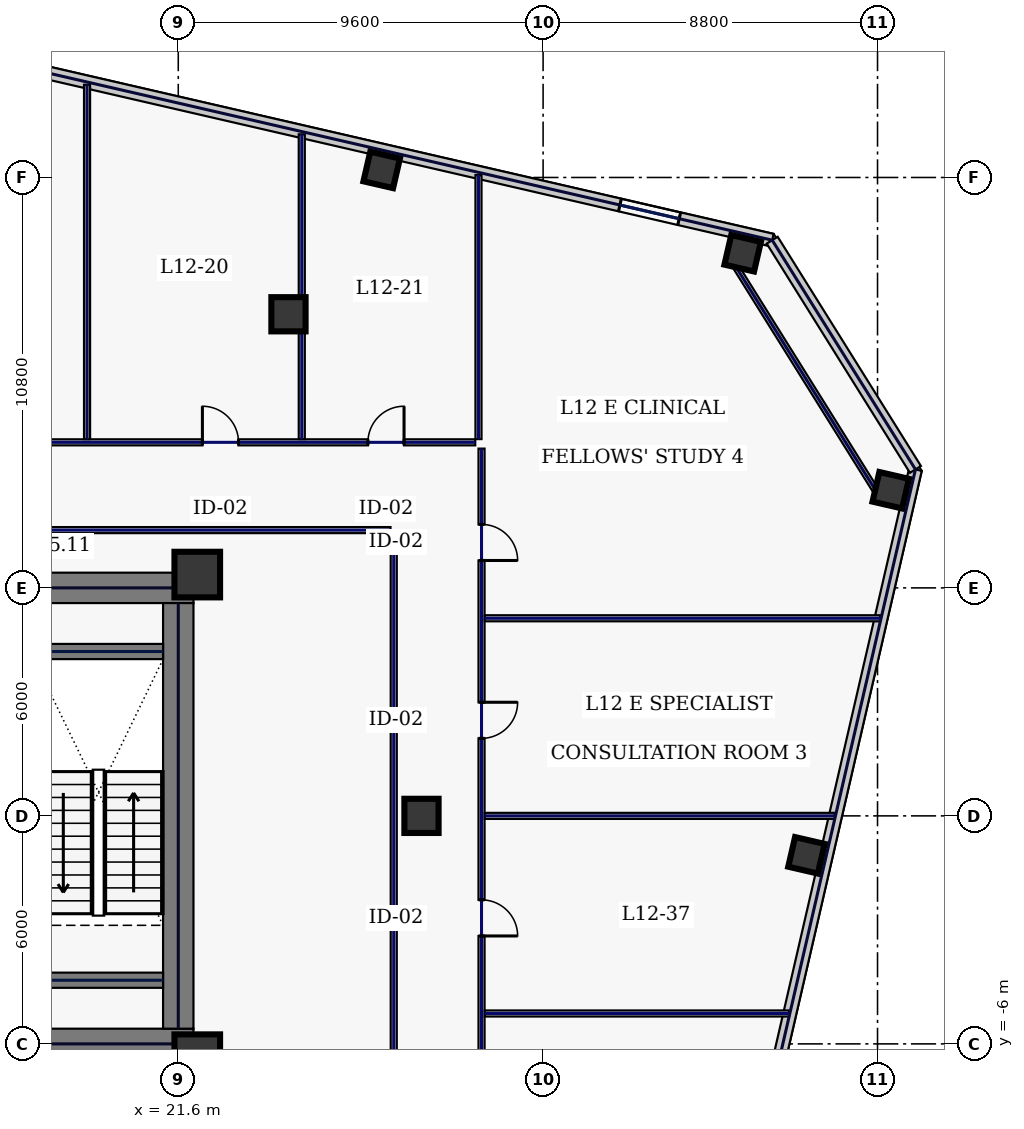
"""IFC4 building model, lengths in metres.
Left out: names, types, materials, properties, quantities, classifications, styles, units other than length and angle.
Written with IfcOpenShell. Run it as: python <this file> out.ifc"""

import sys

from ifc_helpers import new_model, si_unit, direction, frame, frame_2d, origin, origin_2d, place, context, subcontext, project, spatial, rectangle, hollow_rectangle, extrude, element, fill, save


model = new_model("IFC4")
c1 = context("Model", 3, precision=1e-05, world=origin(), true_north=direction((0.0, 1.0)))
c2 = subcontext(c1, "Body", "Model", "MODEL_VIEW")
j1 = project(units=[si_unit("LENGTHUNIT", "METRE"), si_unit("PLANEANGLEUNIT", "RADIAN")], contexts=[c1])
p1 = place(None, origin())
s1 = spatial("IfcSite", under=j1, at=p1, CompositionType="ELEMENT")
p2 = place(p1, origin())
s2 = spatial("IfcBuilding", under=s1, at=p2, CompositionType="ELEMENT")
p3 = place(p2, frame((0.0, 0.0, 59.4)))
s3 = spatial("IfcBuildingStorey", under=s2, at=p3, CompositionType="ELEMENT", Elevation=59.4)
for number, where, z_axis, x_axis in (
    (1, (10.4, 6.0, 0.0), (0.0, 0.0, 1.0), (1.0, 0.0, 0.0)),
    (2, (10.4, -6.0, 0.0), (0.0, 0.0, 1.0), (1.0, 0.0, 0.0)),
):
    element("IfcWall", number, at=place(p3, frame(where, z_axis=z_axis, x_axis=x_axis)), inside=s3, PredefinedType="SHEAR", context=c2, shape_type="SweptSolid", body=[
        extrude(rectangle(XDim=11.6, YDim=0.8, at=frame_2d((5.8, 0.0))), origin(), (0.0, 0.0, 1.0), 3.74),
    ])
p4 = place(p3, frame((21.6, -5.6, 0.0), z_axis=(0.0, 0.0, 1.0), x_axis=(0.0, 1.0, 0.0)))
e3 = element("IfcWall", 3, at=p4, inside=s3, PredefinedType="SHEAR", context=c2, shape_type="SweptSolid", body=[
    extrude(rectangle(XDim=11.2, YDim=0.8, at=frame_2d((5.6, 0.0))), origin(), (0.0, 0.0, 1.0), 3.74),
])
for number, where, z_axis, x_axis in (
    (4, (17.8, -4.325, 0.0), (0.0, 0.0, 1.0), (1.0, 0.0, 0.0)),
    (5, (17.8, 4.325, 0.0), (0.0, 0.0, 1.0), (1.0, 0.0, 0.0)),
):
    element("IfcWall", number, at=place(p3, frame(where, z_axis=z_axis, x_axis=x_axis)), inside=s3, PredefinedType="SHEAR", context=c2, shape_type="SweptSolid", body=[
        extrude(rectangle(XDim=3.4, YDim=0.4, at=frame_2d((1.7, 0.0))), origin(), (0.0, 0.0, 1.0), 3.74),
    ])
for number, where, z_axis, x_axis in (
    (6, (22.1, -6.35, 0.0), (0.0, 0.0, 1.0), (1.0, 0.0, 0.0)),
    (7, (22.1, 6.35, 0.0), (0.0, 0.0, 1.0), (1.0, 0.0, 0.0)),
):
    element("IfcColumn", number, at=place(p3, frame(where, z_axis=z_axis, x_axis=x_axis)), inside=s3, PredefinedType="COLUMN", context=c2, shape_type="SweptSolid", body=[
        extrude(hollow_rectangle(XDim=1.2, YDim=1.2, WallThickness=0.05, at=origin_2d()), origin(), (0.0, 0.0, 1.0), 3.74),
    ])
for number, where, z_axis, x_axis in (
    (8, (24.5, 13.2, 0.0), (0.0, 0.0, 1.0), (1.0, 0.0, 0.0)),
    (9, (28.0, 0.0, 0.0), (0.0, 0.0, 1.0), (1.0, 0.0, 0.0)),
):
    element("IfcColumn", number, at=place(p3, frame(where, z_axis=z_axis, x_axis=x_axis)), inside=s3, PredefinedType="COLUMN", context=c2, shape_type="SweptSolid", body=[
        extrude(hollow_rectangle(XDim=0.9, YDim=0.9, WallThickness=0.04, at=origin_2d()), origin(), (0.0, 0.0, 1.0), 3.74),
    ])
for number, where, z_axis, x_axis in (
    (10, (36.451, 14.806, 0.0), (0.0, 0.0, 1.0), (0.974, -0.225, 0.0)),
    (11, (26.952, 16.999, 0.0), (0.0, 0.0, 1.0), (0.974, -0.225, 0.0)),
    (12, (38.13, -1.038, 0.0), (0.0, 0.0, 1.0), (0.974, -0.225, 0.0)),
    (13, (40.348, 8.57, 0.0), (0.0, 0.0, 1.0), (0.974, -0.225, 0.0)),
):
    element("IfcColumn", number, at=place(p3, frame(where, z_axis=z_axis, x_axis=x_axis)), inside=s3, PredefinedType="COLUMN", context=c2, shape_type="SweptSolid", body=[
        extrude(hollow_rectangle(XDim=0.8, YDim=0.8, WallThickness=0.036, at=origin_2d()), origin(), (0.0, 0.0, 1.0), 3.74),
    ])
p5 = place(p3, frame((37.229, 15.15, 0.0), z_axis=(0.0, 0.0, 1.0), x_axis=(-0.97436993772, 0.224951604723, 0.0)))
e14 = element("IfcWall", 14, at=p5, inside=s3, PredefinedType="STANDARD", context=c2, shape_type="SweptSolid", body=[
    extrude(rectangle(XDim=22.651, YDim=0.34, at=frame_2d((11.326, 0.0))), origin(), (0.0, 0.0, 1.0), 3.74),
])
p6 = place(p5, frame((2.512, 0.0, 0.22)))
e15 = element("IfcOpeningElement", 15, at=p6, cuts=e14, PredefinedType="OPENING", context=c2, shape_type="SweptSolid", body=[
    extrude(rectangle(XDim=1.6, YDim=1.2, at=frame_2d((0.8, 0.6))), frame((0.0, 0.18, 0.0), z_axis=(0.0, -1.0, 0.0), x_axis=(1.0, 0.0, 0.0)), (0.0, 0.0, 1.0), 0.36),
])
p7 = place(p3, frame((31.82, -30.637, 0.0), z_axis=(0.0, 0.0, 1.0), x_axis=(0.224949969076, 0.974370315338, 0.0)))
e16 = element("IfcWall", 16, at=p7, inside=s3, PredefinedType="STANDARD", context=c2, shape_type="SweptSolid", body=[
    extrude(rectangle(XDim=40.8, YDim=0.34, at=frame_2d((20.4, 0.0))), origin(), (0.0, 0.0, 1.0), 3.74),
])
p8 = place(p7, frame((4.3, 0.0, 0.22)))
e17 = element("IfcOpeningElement", 17, at=p8, cuts=e16, PredefinedType="OPENING", context=c2, shape_type="SweptSolid", body=[
    extrude(rectangle(XDim=1.6, YDim=1.2, at=frame_2d((0.8, 0.6))), frame((0.0, 0.18, 0.0), z_axis=(0.0, -1.0, 0.0), x_axis=(1.0, 0.0, 0.0)), (0.0, 0.0, 1.0), 0.36),
])
p9 = place(p7, frame((14.5, 0.0, 0.22)))
e18 = element("IfcOpeningElement", 18, at=p9, cuts=e16, PredefinedType="OPENING", context=c2, shape_type="SweptSolid", body=[
    extrude(rectangle(XDim=1.6, YDim=1.2, at=frame_2d((0.8, 0.6))), frame((0.0, 0.18, 0.0), z_axis=(0.0, -1.0, 0.0), x_axis=(1.0, 0.0, 0.0)), (0.0, 0.0, 1.0), 0.36),
])
p10 = place(p3, frame((40.998, 9.117, 0.0), z_axis=(0.0, 0.0, 1.0), x_axis=(-0.529921811158, 0.848046504656, 0.0)))
e19 = element("IfcWall", 19, at=p10, inside=s3, PredefinedType="STANDARD", context=c2, shape_type="SweptSolid", body=[
    extrude(rectangle(XDim=7.113, YDim=0.34, at=frame_2d((3.557, 0.0))), origin(), (0.0, 0.0, 1.0), 3.74),
])
p11 = place(p3, frame((40.06, 8.389, 0.0), z_axis=(0.0, 0.0, 1.0), x_axis=(-0.529927317139, 0.848043064089, 0.0)))
e20 = element("IfcWall", 20, at=p11, inside=s3, PredefinedType="PARTITIONING", context=c2, shape_type="SweptSolid", body=[
    extrude(rectangle(XDim=7.354, YDim=0.16, at=frame_2d((3.677, 0.0))), origin(), (0.0, 0.0, 1.0), 1.535),
])
p12 = place(p3, frame((-29.415, 9.83, 0.0), z_axis=(0.0, 0.0, 1.0), x_axis=(1.0, 0.0, 0.0)))
e21 = element("IfcWall", 21, at=p12, inside=s3, PredefinedType="PARTITIONING", context=c2, shape_type="SweptSolid", body=[
    extrude(rectangle(XDim=58.83, YDim=0.16, at=frame_2d((29.415, 0.0))), origin(), (0.0, 0.0, 1.0), 3.74),
])
p13 = place(p12, frame((2.044, 0.0, 0.0)))
e22 = element("IfcOpeningElement", 22, at=p13, cuts=e21, PredefinedType="OPENING", context=c2, shape_type="SweptSolid", body=[
    extrude(rectangle(XDim=1.05, YDim=2.2, at=frame_2d((0.525, 1.1))), frame((0.0, 0.09, 0.0), z_axis=(0.0, -1.0, 0.0), x_axis=(1.0, 0.0, 0.0)), (0.0, 0.0, 1.0), 0.18),
])
p14 = place(p12, frame((7.663, 0.0, 0.0)))
e23 = element("IfcOpeningElement", 23, at=p14, cuts=e21, PredefinedType="OPENING", context=c2, shape_type="SweptSolid", body=[
    extrude(rectangle(XDim=0.95, YDim=2.2, at=frame_2d((0.475, 1.1))), frame((0.0, 0.09, 0.0), z_axis=(0.0, -1.0, 0.0), x_axis=(1.0, 0.0, 0.0)), (0.0, 0.0, 1.0), 0.18),
])
p15 = place(p12, frame((14.188, 0.0, 0.0)))
e24 = element("IfcOpeningElement", 24, at=p15, cuts=e21, PredefinedType="OPENING", context=c2, shape_type="SweptSolid", body=[
    extrude(rectangle(XDim=0.95, YDim=2.2, at=frame_2d((0.475, 1.1))), frame((0.0, 0.09, 0.0), z_axis=(0.0, -1.0, 0.0), x_axis=(1.0, 0.0, 0.0)), (0.0, 0.0, 1.0), 0.18),
])
p16 = place(p12, frame((22.025, 0.0, 0.0)))
e25 = element("IfcOpeningElement", 25, at=p16, cuts=e21, PredefinedType="OPENING", context=c2, shape_type="SweptSolid", body=[
    extrude(rectangle(XDim=1.15, YDim=2.2, at=frame_2d((0.575, 1.1))), frame((0.0, 0.09, 0.0), z_axis=(0.0, -1.0, 0.0), x_axis=(1.0, 0.0, 0.0)), (0.0, 0.0, 1.0), 0.18),
])
p17 = place(p12, frame((32.225, 0.0, 0.0)))
e26 = element("IfcOpeningElement", 26, at=p17, cuts=e21, PredefinedType="OPENING", context=c2, shape_type="SweptSolid", body=[
    extrude(rectangle(XDim=0.95, YDim=2.2, at=frame_2d((0.475, 1.1))), frame((0.0, 0.09, 0.0), z_axis=(0.0, -1.0, 0.0), x_axis=(1.0, 0.0, 0.0)), (0.0, 0.0, 1.0), 0.18),
])
p18 = place(p12, frame((42.925, 0.0, 0.0)))
e27 = element("IfcOpeningElement", 27, at=p18, cuts=e21, PredefinedType="OPENING", context=c2, shape_type="SweptSolid", body=[
    extrude(rectangle(XDim=1.05, YDim=2.2, at=frame_2d((0.525, 1.1))), frame((0.0, 0.09, 0.0), z_axis=(0.0, -1.0, 0.0), x_axis=(1.0, 0.0, 0.0)), (0.0, 0.0, 1.0), 0.18),
])
p19 = place(p12, frame((51.65, 0.0, 0.0)))
e28 = element("IfcOpeningElement", 28, at=p19, cuts=e21, PredefinedType="OPENING", context=c2, shape_type="SweptSolid", body=[
    extrude(rectangle(XDim=0.95, YDim=2.2, at=frame_2d((0.475, 1.1))), frame((0.0, 0.09, 0.0), z_axis=(0.0, -1.0, 0.0), x_axis=(1.0, 0.0, 0.0)), (0.0, 0.0, 1.0), 0.18),
])
p20 = place(p12, frame((56.006, 0.0, 0.0)))
e29 = element("IfcOpeningElement", 29, at=p20, cuts=e21, PredefinedType="OPENING", context=c2, shape_type="SweptSolid", body=[
    extrude(rectangle(XDim=0.95, YDim=2.2, at=frame_2d((0.475, 1.1))), frame((0.0, 0.09, 0.0), z_axis=(0.0, -1.0, 0.0), x_axis=(1.0, 0.0, 0.0)), (0.0, 0.0, 1.0), 0.18),
])
p21 = place(p3, frame((29.58, 9.665, 0.0), z_axis=(0.0, 0.0, 1.0), x_axis=(0.0, -1.0, 0.0)))
e30 = element("IfcWall", 30, at=p21, inside=s3, PredefinedType="PARTITIONING", context=c2, shape_type="SweptSolid", body=[
    extrude(rectangle(XDim=19.28, YDim=0.16, at=frame_2d((9.64, 0.0))), origin(), (0.0, 0.0, 1.0), 3.74),
])
p22 = place(p21, frame((16.531, 0.0, 0.0)))
e31 = element("IfcOpeningElement", 31, at=p22, cuts=e30, PredefinedType="OPENING", context=c2, shape_type="SweptSolid", body=[
    extrude(rectangle(XDim=0.95, YDim=2.2, at=frame_2d((0.475, 1.1))), frame((0.0, 0.09, 0.0), z_axis=(0.0, -1.0, 0.0), x_axis=(1.0, 0.0, 0.0)), (0.0, 0.0, 1.0), 0.18),
])
p23 = place(p21, frame((11.875, 0.0, 0.0)))
e32 = element("IfcOpeningElement", 32, at=p23, cuts=e30, PredefinedType="OPENING", context=c2, shape_type="SweptSolid", body=[
    extrude(rectangle(XDim=0.95, YDim=2.2, at=frame_2d((0.475, 1.1))), frame((0.0, 0.09, 0.0), z_axis=(0.0, -1.0, 0.0), x_axis=(1.0, 0.0, 0.0)), (0.0, 0.0, 1.0), 0.18),
])
p24 = place(p21, frame((6.675, 0.0, 0.0)))
e33 = element("IfcOpeningElement", 33, at=p24, cuts=e30, PredefinedType="OPENING", context=c2, shape_type="SweptSolid", body=[
    extrude(rectangle(XDim=0.95, YDim=2.2, at=frame_2d((0.475, 1.1))), frame((0.0, 0.09, 0.0), z_axis=(0.0, -1.0, 0.0), x_axis=(1.0, 0.0, 0.0)), (0.0, 0.0, 1.0), 0.18),
])
p25 = place(p21, frame((1.994, 0.0, 0.0)))
e34 = element("IfcOpeningElement", 34, at=p25, cuts=e30, PredefinedType="OPENING", context=c2, shape_type="SweptSolid", body=[
    extrude(rectangle(XDim=0.95, YDim=2.2, at=frame_2d((0.475, 1.1))), frame((0.0, 0.09, 0.0), z_axis=(0.0, -1.0, 0.0), x_axis=(1.0, 0.0, 0.0)), (0.0, 0.0, 1.0), 0.18),
])
p26 = place(p3, frame((27.185, 7.52, 0.0), z_axis=(0.0, 0.0, 1.0), x_axis=(-1.0, 0.0, 0.0)))
e35 = element("IfcWall", 35, at=p26, inside=s3, PredefinedType="PARTITIONING", context=c2, shape_type="SweptSolid", body=[
    extrude(rectangle(XDim=16.52, YDim=0.16, at=frame_2d((8.26, 0.0))), origin(), (0.0, 0.0, 1.0), 3.74),
])
p27 = place(p3, frame((27.27, -7.385, 0.0), z_axis=(0.0, 0.0, 1.0), x_axis=(0.0, 1.0, 0.0)))
e36 = element("IfcWall", 36, at=p27, inside=s3, PredefinedType="PARTITIONING", context=c2, shape_type="SweptSolid", body=[
    extrude(rectangle(XDim=14.82, YDim=0.16, at=frame_2d((7.41, 0.0))), origin(), (0.0, 0.0, 1.0), 3.74),
])
p28 = place(p3, frame((29.5, 9.915, 0.0), z_axis=(0.0, 0.0, 1.0), x_axis=(0.0, 1.0, 0.0)))
e37 = element("IfcWall", 37, at=p28, inside=s3, PredefinedType="PARTITIONING", context=c2, shape_type="SweptSolid", body=[
    extrude(rectangle(XDim=6.947, YDim=0.16, at=frame_2d((3.474, 0.0))), origin(), (0.0, 0.0, 1.0), 3.74),
])
p29 = place(p3, frame((19.2, 9.915, 0.0), z_axis=(0.0, 0.0, 1.0), x_axis=(0.0, 1.0, 0.0)))
e38 = element("IfcWall", 38, at=p29, inside=s3, PredefinedType="PARTITIONING", context=c2, shape_type="SweptSolid", body=[
    extrude(rectangle(XDim=9.325, YDim=0.16, at=frame_2d((4.663, 0.0))), origin(), (0.0, 0.0, 1.0), 1.535),
])
p30 = place(p3, frame((24.85, 9.915, 0.0), z_axis=(0.0, 0.0, 1.0), x_axis=(0.0, 1.0, 0.0)))
e39 = element("IfcWall", 39, at=p30, inside=s3, PredefinedType="PARTITIONING", context=c2, shape_type="SweptSolid", body=[
    extrude(rectangle(XDim=8.021, YDim=0.16, at=frame_2d((4.01, 0.0))), origin(), (0.0, 0.0, 1.0), 3.74),
])
p31 = place(p3, frame((29.665, -5.2, 0.0), z_axis=(0.0, 0.0, 1.0), x_axis=(1.0, 0.0, 0.0)))
e40 = element("IfcWall", 40, at=p31, inside=s3, PredefinedType="PARTITIONING", context=c2, shape_type="SweptSolid", body=[
    extrude(rectangle(XDim=8.007, YDim=0.16, at=frame_2d((4.003, 0.0))), origin(), (0.0, 0.0, 1.0), 3.74),
])
p32 = place(p3, frame((29.665, 0.0, 0.0), z_axis=(0.0, 0.0, 1.0), x_axis=(1.0, 0.0, 0.0)))
e41 = element("IfcWall", 41, at=p32, inside=s3, PredefinedType="PARTITIONING", context=c2, shape_type="SweptSolid", body=[
    extrude(rectangle(XDim=9.208, YDim=0.16, at=frame_2d((4.604, 0.0))), origin(), (0.0, 0.0, 1.0), 3.235),
])
p33 = place(p3, frame((29.665, 5.2, 0.0), z_axis=(0.0, 0.0, 1.0), x_axis=(1.0, 0.0, 0.0)))
e42 = element("IfcWall", 42, at=p33, inside=s3, PredefinedType="PARTITIONING", context=c2, shape_type="SweptSolid", body=[
    extrude(rectangle(XDim=10.408, YDim=0.16, at=frame_2d((5.204, 0.0))), origin(), (0.0, 0.0, 1.0), 3.74),
])
p34 = place(p6, origin())
e43 = element("IfcWindow", 43, at=p34, inside=s3, PartitioningType="SINGLE_PANEL", PredefinedType="WINDOW", context=c2, shape_type="SweptSolid", body=[
    extrude(rectangle(XDim=1.6, YDim=1.2, at=frame_2d((0.8, 0.6))), frame((0.0, 0.03, 0.0), z_axis=(0.0, -1.0, 0.0), x_axis=(1.0, 0.0, 0.0)), (0.0, 0.0, 1.0), 0.06),
])
fill(e15, e43)
p35 = place(p19, origin())
e44 = element("IfcDoor", 44, at=p35, inside=s3, OperationType="SINGLE_SWING_LEFT", PredefinedType="DOOR", context=c2, shape_type="SweptSolid", body=[
    extrude(rectangle(XDim=0.95, YDim=2.2, at=frame_2d((0.475, 1.1))), frame((0.0, 0.025, 0.0), z_axis=(0.0, -1.0, 0.0), x_axis=(1.0, 0.0, 0.0)), (0.0, 0.0, 1.0), 0.05),
])
fill(e28, e44)
p36 = place(p20, origin())
e45 = element("IfcDoor", 45, at=p36, inside=s3, OperationType="SINGLE_SWING_RIGHT", PredefinedType="DOOR", context=c2, shape_type="SweptSolid", body=[
    extrude(rectangle(XDim=0.95, YDim=2.2, at=frame_2d((0.475, 1.1))), frame((0.0, 0.025, 0.0), z_axis=(0.0, -1.0, 0.0), x_axis=(1.0, 0.0, 0.0)), (0.0, 0.0, 1.0), 0.05),
])
fill(e29, e45)
p37 = place(p23, origin())
e46 = element("IfcDoor", 46, at=p37, inside=s3, OperationType="SINGLE_SWING_RIGHT", PredefinedType="DOOR", context=c2, shape_type="SweptSolid", body=[
    extrude(rectangle(XDim=0.95, YDim=2.2, at=frame_2d((0.475, 1.1))), frame((0.0, 0.025, 0.0), z_axis=(0.0, -1.0, 0.0), x_axis=(1.0, 0.0, 0.0)), (0.0, 0.0, 1.0), 0.05),
])
fill(e32, e46)
p38 = place(p24, origin())
e47 = element("IfcDoor", 47, at=p38, inside=s3, OperationType="SINGLE_SWING_LEFT", PredefinedType="DOOR", context=c2, shape_type="SweptSolid", body=[
    extrude(rectangle(XDim=0.95, YDim=2.2, at=frame_2d((0.475, 1.1))), frame((0.0, 0.025, 0.0), z_axis=(0.0, -1.0, 0.0), x_axis=(1.0, 0.0, 0.0)), (0.0, 0.0, 1.0), 0.05),
])
fill(e33, e47)
p39 = place(p25, origin())
e48 = element("IfcDoor", 48, at=p39, inside=s3, OperationType="SINGLE_SWING_RIGHT", PredefinedType="DOOR", context=c2, shape_type="SweptSolid", body=[
    extrude(rectangle(XDim=0.95, YDim=2.2, at=frame_2d((0.475, 1.1))), frame((0.0, 0.025, 0.0), z_axis=(0.0, -1.0, 0.0), x_axis=(1.0, 0.0, 0.0)), (0.0, 0.0, 1.0), 0.05),
])
fill(e34, e48)
save(model, sys.argv[1])
